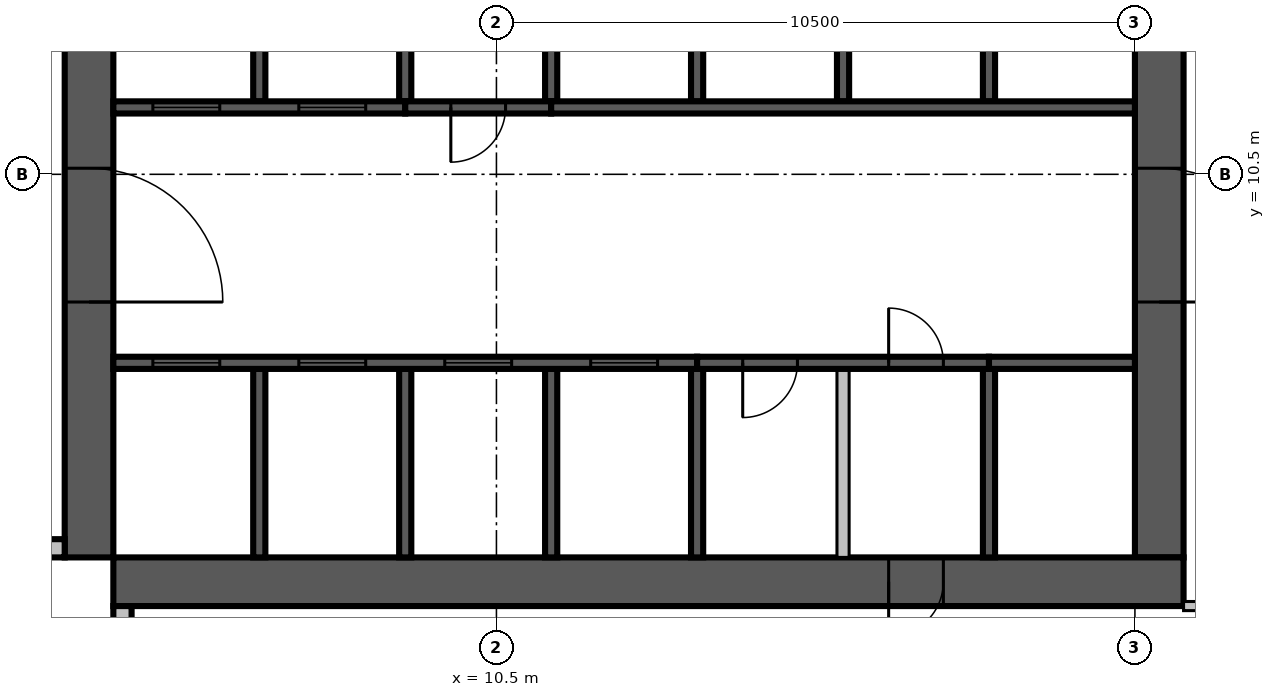
"""IFC4 building model, lengths in metres.
Left out: names, types, materials, properties, quantities, classifications, styles, units other than length and angle.
Written with IfcOpenShell. Run it as: python <this file> out.ifc"""

import sys

from ifc_helpers import new_model, si_unit, direction, frame, frame_2d, origin, place, context, subcontext, project, spatial, rectangle, extrude, source, transform, mapped, element, fill, save


model = new_model("IFC4")
c1 = context("Model", 3, precision=1e-05, world=origin(), true_north=direction((0.0, 1.0)))
c2 = subcontext(c1, "Body", "Model", "MODEL_VIEW")
j1 = project(units=[si_unit("LENGTHUNIT", "METRE"), si_unit("PLANEANGLEUNIT", "RADIAN")], contexts=[c1])
p1 = place(None, origin())
s1 = spatial("IfcSite", under=j1, at=p1, CompositionType="ELEMENT")
p2 = place(p1, origin())
s2 = spatial("IfcBuilding", under=s1, at=p2, CompositionType="ELEMENT")
p3 = place(p2, frame((0.0, 0.0, 246.2)))
s3 = spatial("IfcBuildingStorey", under=s2, at=p3, CompositionType="ELEMENT", Elevation=246.2)
m1 = source(origin(), c2, "Body", "SweptSolid", [
    extrude(rectangle(XDim=17.6, YDim=0.8, at=frame_2d((8.8, 0.0))), origin(), (0.0, 0.0, 1.0), 3.8),
])
p4 = place(p3, frame((3.8, 4.2, 0.0), z_axis=(0.0, 0.0, 1.0), x_axis=(0.0, 1.0, 0.0)))
e1 = element("IfcWall", 1, at=p4, inside=s3, PredefinedType="SHEAR", context=c2, shape_type="MappedRepresentation", body=[
    mapped(m1, transform((0.0, 0.0, 0.0), scale=1.0)),
])
m2 = source(origin(), c2, "Body", "SweptSolid", [
    extrude(rectangle(XDim=2.2, YDim=2.1, at=frame_2d((1.1, 1.05))), frame((0.0, 0.41, 0.0), z_axis=(0.0, -1.0, 0.0), x_axis=(1.0, 0.0, 0.0)), (0.0, 0.0, 1.0), 0.82),
])
p5 = place(p4, frame((4.2, 0.0, 0.0)))
e2 = element("IfcOpeningElement", 2, at=p5, cuts=e1, PredefinedType="OPENING", context=c2, shape_type="MappedRepresentation", body=[
    mapped(m2, transform((0.0, 0.0, 0.0), scale=1.0)),
])
m3 = source(origin(), c2, "Body", "SweptSolid", [
    extrude(rectangle(XDim=0.9, YDim=2.1, at=frame_2d((0.45, 1.05))), frame((0.0, 0.41, 0.0), z_axis=(0.0, -1.0, 0.0), x_axis=(1.0, 0.0, 0.0)), (0.0, 0.0, 1.0), 0.82),
])
p6 = place(p4, frame((10.95, 0.0, 0.0)))
e3 = element("IfcOpeningElement", 3, at=p6, cuts=e1, PredefinedType="OPENING", context=c2, shape_type="MappedRepresentation", body=[
    mapped(m3, transform((0.0, 0.0, 0.0), scale=1.0)),
])
m4 = source(origin(), c2, "Body", "SweptSolid", [
    extrude(rectangle(XDim=16.8, YDim=0.8, at=frame_2d((8.4, 0.0))), origin(), (0.0, 0.0, 1.0), 3.8),
])
p7 = place(p3, frame((21.4, 4.2, 0.0), z_axis=(0.0, 0.0, 1.0), x_axis=(0.0, 1.0, 0.0)))
e4 = element("IfcWall", 4, at=p7, inside=s3, PredefinedType="SHEAR", context=c2, shape_type="MappedRepresentation", body=[
    mapped(m4, transform((0.0, 0.0, 0.0), scale=1.0)),
])
p8 = place(p7, frame((4.2, 0.0, 0.0)))
e5 = element("IfcOpeningElement", 5, at=p8, cuts=e4, PredefinedType="OPENING", context=c2, shape_type="MappedRepresentation", body=[
    mapped(m2, transform((0.0, 0.0, 0.0), scale=1.0)),
])
m5 = source(origin(), c2, "Body", "SweptSolid", [
    extrude(rectangle(XDim=1.2, YDim=2.1, at=frame_2d((0.6, 1.05))), frame((0.0, 0.41, 0.0), z_axis=(0.0, -1.0, 0.0), x_axis=(1.0, 0.0, 0.0)), (0.0, 0.0, 1.0), 0.82),
])
p9 = place(p7, frame((14.7, 0.0, 0.0)))
e6 = element("IfcOpeningElement", 6, at=p9, cuts=e4, PredefinedType="OPENING", context=c2, shape_type="MappedRepresentation", body=[
    mapped(m5, transform((0.0, 0.0, 0.0), scale=1.0)),
])
p10 = place(p3, frame((4.2, 3.8, 0.0), z_axis=(0.0, 0.0, 1.0), x_axis=(1.0, 0.0, 0.0)))
e7 = element("IfcWall", 7, at=p10, inside=s3, PredefinedType="SHEAR", context=c2, shape_type="MappedRepresentation", body=[
    mapped(m1, transform((0.0, 0.0, 0.0), scale=1.0)),
])
p11 = place(p10, frame((12.75, 0.0, 0.0)))
e8 = element("IfcOpeningElement", 8, at=p11, cuts=e7, PredefinedType="OPENING", context=c2, shape_type="MappedRepresentation", body=[
    mapped(m3, transform((0.0, 0.0, 0.0), scale=1.0)),
])
m6 = source(origin(), c2, "Body", "SweptSolid", [
    extrude(rectangle(XDim=3.4, YDim=0.3, at=frame_2d((1.7, 0.0))), origin(), (0.0, 0.0, 1.0), 3.4),
])
p12 = place(p3, frame((0.0, 4.35, 0.0), z_axis=(0.0, 0.0, 1.0), x_axis=(1.0, 0.0, 0.0)))
e9 = element("IfcWall", 9, at=p12, inside=s3, PredefinedType="STANDARD", context=c2, shape_type="MappedRepresentation", body=[
    mapped(m6, transform((0.0, 0.0, 0.0), scale=1.0)),
])
m7 = source(origin(), c2, "Body", "SweptSolid", [
    extrude(rectangle(XDim=1.8, YDim=2.3, at=frame_2d((0.9, 1.15))), frame((0.0, 0.16, 0.0), z_axis=(0.0, -1.0, 0.0), x_axis=(1.0, 0.0, 0.0)), (0.0, 0.0, 1.0), 0.32),
])
p13 = place(p12, frame((1.2, 0.0, 0.6)))
e10 = element("IfcOpeningElement", 10, at=p13, cuts=e9, PredefinedType="OPENING", context=c2, shape_type="MappedRepresentation", body=[
    mapped(m7, transform((0.0, 0.0, 0.0), scale=1.0)),
])
p14 = place(p3, frame((4.35, 3.4, 0.0), z_axis=(0.0, 0.0, 1.0), x_axis=(0.0, -1.0, 0.0)))
e11 = element("IfcWall", 11, at=p14, inside=s3, PredefinedType="STANDARD", context=c2, shape_type="MappedRepresentation", body=[
    mapped(m6, transform((0.0, 0.0, 0.0), scale=1.0)),
])
p15 = place(p14, frame((0.4, 0.0, 0.6)))
e12 = element("IfcOpeningElement", 12, at=p15, cuts=e11, PredefinedType="OPENING", context=c2, shape_type="MappedRepresentation", body=[
    mapped(m7, transform((0.0, 0.0, 0.0), scale=1.0)),
])
m8 = source(origin(), c2, "Body", "SweptSolid", [
    extrude(rectangle(XDim=3.1, YDim=0.2, at=frame_2d((1.55, 0.0))), origin(), (0.0, 0.0, 1.0), 3.8),
])
for number, where, z_axis, x_axis in (
    (13, (6.6, 4.2, 0.0), (0.0, 0.0, 1.0), (0.0, 1.0, 0.0)),
    (14, (9.0, 4.2, 0.0), (0.0, 0.0, 1.0), (0.0, 1.0, 0.0)),
    (15, (11.4, 4.2, 0.0), (0.0, 0.0, 1.0), (0.0, 1.0, 0.0)),
):
    element("IfcWall", number, at=place(p3, frame(where, z_axis=z_axis, x_axis=x_axis)), inside=s3, PredefinedType="SOLIDWALL", context=c2, shape_type="MappedRepresentation", body=[
        mapped(m8, transform((0.0, 0.0, 0.0), scale=1.0)),
    ])
m9 = source(origin(), c2, "Body", "SweptSolid", [
    extrude(rectangle(XDim=3.1, YDim=0.2, at=frame_2d((1.55, 0.0))), origin(), (0.0, 0.0, 1.0), 3.4),
])
for number, where, z_axis, x_axis in (
    (16, (13.8, 4.2, 0.0), (0.0, 0.0, 1.0), (0.0, 1.0, 0.0)),
    (17, (18.6, 4.2, 0.0), (0.0, 0.0, 1.0), (0.0, 1.0, 0.0)),
):
    element("IfcWall", number, at=place(p3, frame(where, z_axis=z_axis, x_axis=x_axis)), inside=s3, PredefinedType="SOLIDWALL", context=c2, shape_type="MappedRepresentation", body=[
        mapped(m9, transform((0.0, 0.0, 0.0), scale=1.0)),
    ])
m10 = source(origin(), c2, "Body", "SweptSolid", [
    extrude(rectangle(XDim=3.1, YDim=0.2, at=frame_2d((1.55, 0.0))), origin(), (0.0, 0.0, 1.0), 3.4),
])
p16 = place(p3, frame((16.2, 4.2, 0.0), z_axis=(0.0, 0.0, 1.0), x_axis=(0.0, 1.0, 0.0)))
e18 = element("IfcWall", 18, at=p16, inside=s3, PredefinedType="PARTITIONING", context=c2, shape_type="MappedRepresentation", body=[
    mapped(m10, transform((0.0, 0.0, 0.0), scale=1.0)),
])
m11 = source(origin(), c2, "Body", "SweptSolid", [
    extrude(rectangle(XDim=3.0, YDim=0.2, at=frame_2d((1.5, 0.0))), origin(), (0.0, 0.0, 1.0), 3.8),
])
p17 = place(p3, frame((6.6, 11.7, 0.0), z_axis=(0.0, 0.0, 1.0), x_axis=(0.0, 1.0, 0.0)))
e19 = element("IfcWall", 19, at=p17, inside=s3, PredefinedType="SOLIDWALL", context=c2, shape_type="MappedRepresentation", body=[
    mapped(m11, transform((0.0, 0.0, 0.0), scale=1.0)),
])
m12 = source(origin(), c2, "Body", "SweptSolid", [
    extrude(rectangle(XDim=3.0, YDim=0.2, at=frame_2d((1.5, 0.0))), origin(), (0.0, 0.0, 1.0), 3.4),
])
for number, where, z_axis, x_axis in (
    (20, (9.0, 11.7, 0.0), (0.0, 0.0, 1.0), (0.0, 1.0, 0.0)),
    (21, (11.4, 11.7, 0.0), (0.0, 0.0, 1.0), (0.0, 1.0, 0.0)),
):
    element("IfcWall", number, at=place(p3, frame(where, z_axis=z_axis, x_axis=x_axis)), inside=s3, PredefinedType="SOLIDWALL", context=c2, shape_type="MappedRepresentation", body=[
        mapped(m12, transform((0.0, 0.0, 0.0), scale=1.0)),
    ])
for number, where, z_axis, x_axis in (
    (22, (13.8, 11.7, 0.0), (0.0, 0.0, 1.0), (0.0, 1.0, 0.0)),
    (23, (16.2, 11.7, 0.0), (0.0, 0.0, 1.0), (0.0, 1.0, 0.0)),
    (24, (18.6, 11.7, 0.0), (0.0, 0.0, 1.0), (0.0, 1.0, 0.0)),
):
    element("IfcWall", number, at=place(p3, frame(where, z_axis=z_axis, x_axis=x_axis)), inside=s3, PredefinedType="SOLIDWALL", context=c2, shape_type="MappedRepresentation", body=[
        mapped(m11, transform((0.0, 0.0, 0.0), scale=1.0)),
    ])
m13 = source(origin(), c2, "Body", "SweptSolid", [
    extrude(rectangle(XDim=9.6, YDim=0.2, at=frame_2d((4.8, 0.0))), origin(), (0.0, 0.0, 1.0), 3.8),
])
p18 = place(p3, frame((4.2, 7.4, 0.0), z_axis=(0.0, 0.0, 1.0), x_axis=(1.0, 0.0, 0.0)))
e25 = element("IfcWall", 25, at=p18, inside=s3, PredefinedType="SOLIDWALL", context=c2, shape_type="MappedRepresentation", body=[
    mapped(m13, transform((0.0, 0.0, 0.0), scale=1.0)),
])
m14 = source(origin(), c2, "Body", "SweptSolid", [
    extrude(rectangle(XDim=1.1, YDim=2.1, at=frame_2d((0.55, 1.05))), frame((0.0, 0.11, 0.0), z_axis=(0.0, -1.0, 0.0), x_axis=(1.0, 0.0, 0.0)), (0.0, 0.0, 1.0), 0.22),
])
p19 = place(p18, frame((0.65, 0.0, 0.0)))
e26 = element("IfcOpeningElement", 26, at=p19, cuts=e25, PredefinedType="OPENING", context=c2, shape_type="MappedRepresentation", body=[
    mapped(m14, transform((0.0, 0.0, 0.0), scale=1.0)),
])
p20 = place(p18, frame((3.05, 0.0, 0.0)))
e27 = element("IfcOpeningElement", 27, at=p20, cuts=e25, PredefinedType="OPENING", context=c2, shape_type="MappedRepresentation", body=[
    mapped(m14, transform((0.0, 0.0, 0.0), scale=1.0)),
])
p21 = place(p18, frame((5.45, 0.0, 0.0)))
e28 = element("IfcOpeningElement", 28, at=p21, cuts=e25, PredefinedType="OPENING", context=c2, shape_type="MappedRepresentation", body=[
    mapped(m14, transform((0.0, 0.0, 0.0), scale=1.0)),
])
p22 = place(p18, frame((7.85, 0.0, 0.0)))
e29 = element("IfcOpeningElement", 29, at=p22, cuts=e25, PredefinedType="OPENING", context=c2, shape_type="MappedRepresentation", body=[
    mapped(m14, transform((0.0, 0.0, 0.0), scale=1.0)),
])
m15 = source(origin(), c2, "Body", "SweptSolid", [
    extrude(rectangle(XDim=4.8, YDim=0.2, at=frame_2d((2.4, 0.0))), origin(), (0.0, 0.0, 1.0), 3.4),
])
p23 = place(p3, frame((13.8, 7.4, 0.0), z_axis=(0.0, 0.0, 1.0), x_axis=(1.0, 0.0, 0.0)))
e30 = element("IfcWall", 30, at=p23, inside=s3, PredefinedType="SOLIDWALL", context=c2, shape_type="MappedRepresentation", body=[
    mapped(m15, transform((0.0, 0.0, 0.0), scale=1.0)),
])
m16 = source(origin(), c2, "Body", "SweptSolid", [
    extrude(rectangle(XDim=0.9, YDim=2.1, at=frame_2d((0.45, 1.05))), frame((0.0, 0.11, 0.0), z_axis=(0.0, -1.0, 0.0), x_axis=(1.0, 0.0, 0.0)), (0.0, 0.0, 1.0), 0.22),
])
p24 = place(p23, frame((0.75, 0.0, 0.0)))
e31 = element("IfcOpeningElement", 31, at=p24, cuts=e30, PredefinedType="OPENING", context=c2, shape_type="MappedRepresentation", body=[
    mapped(m16, transform((0.0, 0.0, 0.0), scale=1.0)),
])
p25 = place(p23, frame((3.15, 0.0, 0.0)))
e32 = element("IfcOpeningElement", 32, at=p25, cuts=e30, PredefinedType="OPENING", context=c2, shape_type="MappedRepresentation", body=[
    mapped(m16, transform((0.0, 0.0, 0.0), scale=1.0)),
])
m17 = source(origin(), c2, "Body", "SweptSolid", [
    extrude(rectangle(XDim=2.4, YDim=0.2, at=frame_2d((1.2, 0.0))), origin(), (0.0, 0.0, 1.0), 3.8),
])
p26 = place(p3, frame((18.6, 7.4, 0.0), z_axis=(0.0, 0.0, 1.0), x_axis=(1.0, 0.0, 0.0)))
e33 = element("IfcWall", 33, at=p26, inside=s3, PredefinedType="SOLIDWALL", context=c2, shape_type="MappedRepresentation", body=[
    mapped(m17, transform((0.0, 0.0, 0.0), scale=1.0)),
])
m18 = source(origin(), c2, "Body", "SweptSolid", [
    extrude(rectangle(XDim=4.8, YDim=0.2, at=frame_2d((2.4, 0.0))), origin(), (0.0, 0.0, 1.0), 3.8),
])
p27 = place(p3, frame((4.2, 11.6, 0.0), z_axis=(0.0, 0.0, 1.0), x_axis=(1.0, 0.0, 0.0)))
e34 = element("IfcWall", 34, at=p27, inside=s3, PredefinedType="SOLIDWALL", context=c2, shape_type="MappedRepresentation", body=[
    mapped(m18, transform((0.0, 0.0, 0.0), scale=1.0)),
])
p28 = place(p27, frame((0.65, 0.0, 0.0)))
e35 = element("IfcOpeningElement", 35, at=p28, cuts=e34, PredefinedType="OPENING", context=c2, shape_type="MappedRepresentation", body=[
    mapped(m14, transform((0.0, 0.0, 0.0), scale=1.0)),
])
p29 = place(p27, frame((3.05, 0.0, 0.0)))
e36 = element("IfcOpeningElement", 36, at=p29, cuts=e34, PredefinedType="OPENING", context=c2, shape_type="MappedRepresentation", body=[
    mapped(m14, transform((0.0, 0.0, 0.0), scale=1.0)),
])
m19 = source(origin(), c2, "Body", "SweptSolid", [
    extrude(rectangle(XDim=2.4, YDim=0.2, at=frame_2d((1.2, 0.0))), origin(), (0.0, 0.0, 1.0), 3.4),
])
p30 = place(p3, frame((9.0, 11.6, 0.0), z_axis=(0.0, 0.0, 1.0), x_axis=(1.0, 0.0, 0.0)))
e37 = element("IfcWall", 37, at=p30, inside=s3, PredefinedType="SOLIDWALL", context=c2, shape_type="MappedRepresentation", body=[
    mapped(m19, transform((0.0, 0.0, 0.0), scale=1.0)),
])
p31 = place(p30, frame((0.75, 0.0, 0.0)))
e38 = element("IfcOpeningElement", 38, at=p31, cuts=e37, PredefinedType="OPENING", context=c2, shape_type="MappedRepresentation", body=[
    mapped(m16, transform((0.0, 0.0, 0.0), scale=1.0)),
])
p32 = place(p3, frame((11.4, 11.6, 0.0), z_axis=(0.0, 0.0, 1.0), x_axis=(1.0, 0.0, 0.0)))
e39 = element("IfcWall", 39, at=p32, inside=s3, PredefinedType="SOLIDWALL", context=c2, shape_type="MappedRepresentation", body=[
    mapped(m13, transform((0.0, 0.0, 0.0), scale=1.0)),
])
m20 = source(origin(), c2, "Body", "SweptSolid", [
    extrude(rectangle(XDim=7.525, YDim=0.15, at=frame_2d((3.763, 0.0))), origin(), (0.0, 0.0, 1.0), 3.4),
])
p33 = place(p3, frame((21.8, 3.4, 0.0), z_axis=(0.0, 0.0, 1.0), x_axis=(1.0, 0.0, 0.0)))
e40 = element("IfcWall", 40, at=p33, inside=s3, PredefinedType="PARTITIONING", context=c2, shape_type="MappedRepresentation", body=[
    mapped(m20, transform((0.0, 0.0, 0.0), scale=1.0)),
])
m21 = source(origin(), c2, "Body", "SweptSolid", [
    extrude(rectangle(XDim=1.0, YDim=2.1, at=frame_2d((0.5, 1.05))), frame((0.0, 0.085, 0.0), z_axis=(0.0, -1.0, 0.0), x_axis=(1.0, 0.0, 0.0)), (0.0, 0.0, 1.0), 0.17),
])
p34 = place(p33, frame((3.0, 0.0, 0.0)))
e41 = element("IfcOpeningElement", 41, at=p34, cuts=e40, PredefinedType="OPENING", context=c2, shape_type="MappedRepresentation", body=[
    mapped(m21, transform((0.0, 0.0, 0.0), scale=1.0)),
])
m22 = source(origin(), c2, "Body", "SweptSolid", [
    extrude(rectangle(XDim=0.9, YDim=2.1, at=frame_2d((0.45, 1.05))), frame((0.0, 0.085, 0.0), z_axis=(0.0, -1.0, 0.0), x_axis=(1.0, 0.0, 0.0)), (0.0, 0.0, 1.0), 0.17),
])
p35 = place(p33, frame((4.413, 0.0, 0.0)))
e42 = element("IfcOpeningElement", 42, at=p35, cuts=e40, PredefinedType="OPENING", context=c2, shape_type="MappedRepresentation", body=[
    mapped(m22, transform((0.0, 0.0, 0.0), scale=1.0)),
])
m23 = source(origin(), c2, "Body", "SweptSolid", [
    extrude(rectangle(XDim=1.1, YDim=2.1, at=frame_2d((0.55, 1.05))), frame((0.0, 0.025, 0.0), z_axis=(0.0, -1.0, 0.0), x_axis=(1.0, 0.0, 0.0)), (0.0, 0.0, 1.0), 0.05),
])
p36 = place(p19, origin())
e43 = element("IfcDoor", 43, at=p36, inside=s3, OperationType="SLIDING_TO_LEFT", PredefinedType="DOOR", context=c2, shape_type="MappedRepresentation", body=[
    mapped(m23, transform((0.0, 0.0, 0.0), scale=1.0)),
])
fill(e26, e43)
p37 = place(p20, origin())
e44 = element("IfcDoor", 44, at=p37, inside=s3, OperationType="SLIDING_TO_LEFT", PredefinedType="DOOR", context=c2, shape_type="MappedRepresentation", body=[
    mapped(m23, transform((0.0, 0.0, 0.0), scale=1.0)),
])
fill(e27, e44)
p38 = place(p21, origin())
e45 = element("IfcDoor", 45, at=p38, inside=s3, OperationType="SLIDING_TO_LEFT", PredefinedType="DOOR", context=c2, shape_type="MappedRepresentation", body=[
    mapped(m23, transform((0.0, 0.0, 0.0), scale=1.0)),
])
fill(e28, e45)
p39 = place(p22, origin())
e46 = element("IfcDoor", 46, at=p39, inside=s3, OperationType="SLIDING_TO_LEFT", PredefinedType="DOOR", context=c2, shape_type="MappedRepresentation", body=[
    mapped(m23, transform((0.0, 0.0, 0.0), scale=1.0)),
])
fill(e29, e46)
m24 = source(origin(), c2, "Body", "SweptSolid", [
    extrude(rectangle(XDim=0.9, YDim=2.1, at=frame_2d((0.45, 1.05))), frame((0.0, 0.025, 0.0), z_axis=(0.0, -1.0, 0.0), x_axis=(1.0, 0.0, 0.0)), (0.0, 0.0, 1.0), 0.05),
])
p40 = place(p24, origin())
e47 = element("IfcDoor", 47, at=p40, inside=s3, OperationType="SINGLE_SWING_RIGHT", PredefinedType="DOOR", context=c2, shape_type="MappedRepresentation", body=[
    mapped(m24, transform((0.0, 0.0, 0.0), scale=1.0)),
])
fill(e31, e47)
p41 = place(p25, origin())
e48 = element("IfcDoor", 48, at=p41, inside=s3, OperationType="SINGLE_SWING_LEFT", PredefinedType="DOOR", context=c2, shape_type="MappedRepresentation", body=[
    mapped(m24, transform((0.0, 0.0, 0.0), scale=1.0)),
])
fill(e32, e48)
p42 = place(p28, origin())
e49 = element("IfcDoor", 49, at=p42, inside=s3, OperationType="SLIDING_TO_LEFT", PredefinedType="DOOR", context=c2, shape_type="MappedRepresentation", body=[
    mapped(m23, transform((0.0, 0.0, 0.0), scale=1.0)),
])
fill(e35, e49)
p43 = place(p29, origin())
e50 = element("IfcDoor", 50, at=p43, inside=s3, OperationType="SLIDING_TO_LEFT", PredefinedType="DOOR", context=c2, shape_type="MappedRepresentation", body=[
    mapped(m23, transform((0.0, 0.0, 0.0), scale=1.0)),
])
fill(e36, e50)
p44 = place(p31, origin())
e51 = element("IfcDoor", 51, at=p44, inside=s3, OperationType="SINGLE_SWING_RIGHT", PredefinedType="DOOR", context=c2, shape_type="MappedRepresentation", body=[
    mapped(m24, transform((0.0, 0.0, 0.0), scale=1.0)),
])
fill(e38, e51)
m25 = source(origin(), c2, "Body", "SweptSolid", [
    extrude(rectangle(XDim=2.2, YDim=2.1, at=frame_2d((1.1, 1.05))), frame((0.0, 0.025, 0.0), z_axis=(0.0, -1.0, 0.0), x_axis=(1.0, 0.0, 0.0)), (0.0, 0.0, 1.0), 0.05),
])
p45 = place(p8, origin())
e52 = element("IfcDoor", 52, at=p45, inside=s3, OperationType="DOUBLE_DOOR_SINGLE_SWING", PredefinedType="DOOR", context=c2, shape_type="MappedRepresentation", body=[
    mapped(m25, transform((0.0, 0.0, 0.0), scale=1.0)),
])
fill(e5, e52)
p46 = place(p5, origin())
e53 = element("IfcDoor", 53, at=p46, inside=s3, OperationType="DOUBLE_DOOR_SINGLE_SWING", PredefinedType="DOOR", context=c2, shape_type="MappedRepresentation", body=[
    mapped(m25, transform((0.0, 0.0, 0.0), scale=1.0)),
])
fill(e2, e53)
p47 = place(p11, origin())
e54 = element("IfcDoor", 54, at=p47, inside=s3, OperationType="SINGLE_SWING_RIGHT", PredefinedType="DOOR", context=c2, shape_type="MappedRepresentation", body=[
    mapped(m24, transform((0.0, 0.0, 0.0), scale=1.0)),
])
fill(e8, e54)
save(model, sys.argv[1])
